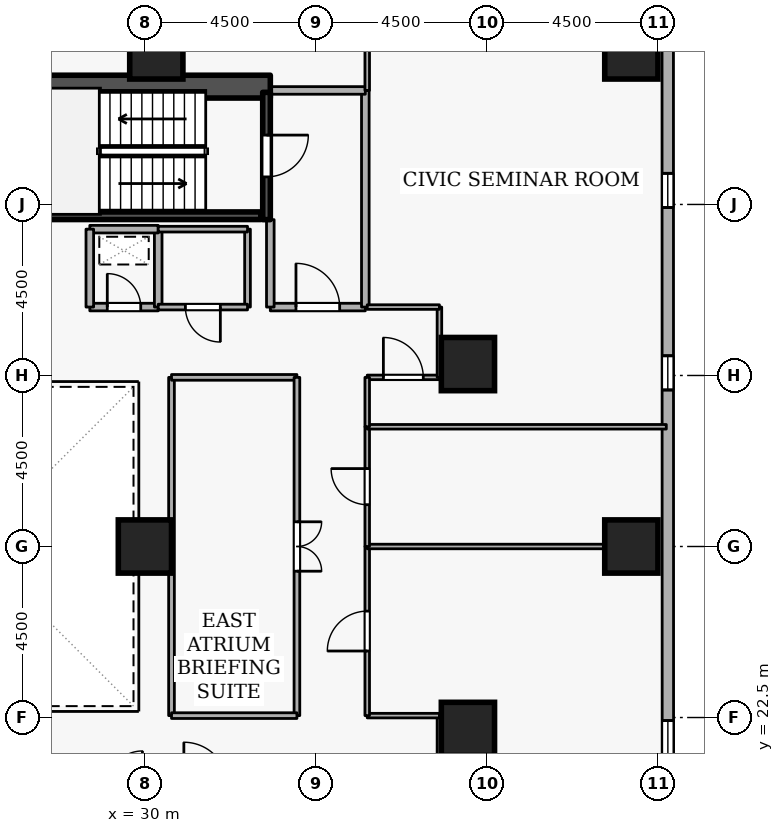
"""IFC4 building model, lengths in metres.
Left out: names, types, materials, properties, quantities, classifications, styles, units other than length and angle.
Written with IfcOpenShell. Run it as: python <this file> out.ifc"""

import sys

from ifc_helpers import new_model, si_unit, direction, frame, frame_2d, origin, origin_2d, place, context, subcontext, project, spatial, rectangle, extrude, element, fill, save


model = new_model("IFC4")
c1 = context("Model", 3, precision=1e-05, world=origin(), true_north=direction((0.0, 1.0)))
c2 = subcontext(c1, "Body", "Model", "MODEL_VIEW")
j1 = project(units=[si_unit("LENGTHUNIT", "METRE"), si_unit("PLANEANGLEUNIT", "RADIAN")], contexts=[c1])
p1 = place(None, origin())
s1 = spatial("IfcSite", under=j1, at=p1, CompositionType="ELEMENT")
p2 = place(p1, origin())
s2 = spatial("IfcBuilding", under=s1, at=p2, CompositionType="ELEMENT")
p3 = place(p2, frame((0.0, 0.0, 42.3)))
s3 = spatial("IfcBuildingStorey", under=s2, at=p3, CompositionType="ELEMENT", Elevation=42.3)
p4 = place(p3, frame((17.7, 39.1, 0.0), z_axis=(0.0, 0.0, 1.0), x_axis=(1.0, 0.0, 0.0)))
e1 = element("IfcWall", 1, at=p4, inside=s3, PredefinedType="SHEAR", context=c2, shape_type="SweptSolid", body=[
    extrude(rectangle(XDim=15.6, YDim=0.6, at=frame_2d((7.8, 0.0))), origin(), (0.0, 0.0, 1.0), 3.6),
])
for number, where, z_axis, x_axis in (
    (2, (42.8, 27.0, 0.0), (0.0, 0.0, 1.0), (1.0, 0.0, 0.0)),
    (3, (42.8, 40.0, 0.0), (0.0, 0.0, 1.0), (1.0, 0.0, 0.0)),
    (4, (38.5, 22.2, 0.0), (0.0, 0.0, 1.0), (1.0, 0.0, 0.0)),
    (5, (38.5, 31.8, 0.0), (0.0, 0.0, 1.0), (1.0, 0.0, 0.0)),
    (6, (30.3, 40.0, 0.0), (0.0, 0.0, 1.0), (1.0, 0.0, 0.0)),
    (7, (30.0, 27.0, 0.0), (0.0, 0.0, 1.0), (1.0, 0.0, 0.0)),
):
    element("IfcColumn", number, at=place(p3, frame(where, z_axis=z_axis, x_axis=x_axis)), inside=s3, PredefinedType="COLUMN", context=c2, shape_type="SweptSolid", body=[
        extrude(rectangle(XDim=1.4, YDim=1.4, at=origin_2d()), origin(), (0.0, 0.0, 1.0), 3.6),
    ])
p5 = place(p3, frame((43.765, 5.319, 0.0), z_axis=(0.0, 0.0, 1.0), x_axis=(-0.000208784245, 0.999999978205, 0.0)))
e8 = element("IfcWall", 8, at=p5, inside=s3, PredefinedType="STANDARD", context=c2, shape_type="SweptSolid", body=[
    extrude(rectangle(XDim=35.08, YDim=0.3, at=frame_2d((17.54, 0.0))), origin(), (0.0, 0.0, 1.0), 2.7),
])
p6 = place(p5, frame((1.8, 0.0, 0.72)))
e9 = element("IfcOpeningElement", 9, at=p6, cuts=e8, PredefinedType="OPENING", context=c2, shape_type="SweptSolid", body=[
    extrude(rectangle(XDim=0.9, YDim=1.75, at=frame_2d((0.45, 0.875))), frame((0.0, 0.16, 0.0), z_axis=(0.0, -1.0, 0.0), x_axis=(1.0, 0.0, 0.0)), (0.0, 0.0, 1.0), 0.32),
])
p7 = place(p5, frame((6.6, 0.0, 0.72)))
e10 = element("IfcOpeningElement", 10, at=p7, cuts=e8, PredefinedType="OPENING", context=c2, shape_type="SweptSolid", body=[
    extrude(rectangle(XDim=0.9, YDim=1.75, at=frame_2d((0.45, 0.875))), frame((0.0, 0.16, 0.0), z_axis=(0.0, -1.0, 0.0), x_axis=(1.0, 0.0, 0.0)), (0.0, 0.0, 1.0), 0.32),
])
p8 = place(p5, frame((11.4, 0.0, 0.72)))
e11 = element("IfcOpeningElement", 11, at=p8, cuts=e8, PredefinedType="OPENING", context=c2, shape_type="SweptSolid", body=[
    extrude(rectangle(XDim=0.9, YDim=1.75, at=frame_2d((0.45, 0.875))), frame((0.0, 0.16, 0.0), z_axis=(0.0, -1.0, 0.0), x_axis=(1.0, 0.0, 0.0)), (0.0, 0.0, 1.0), 0.32),
])
p9 = place(p5, frame((16.2, 0.0, 0.72)))
e12 = element("IfcOpeningElement", 12, at=p9, cuts=e8, PredefinedType="OPENING", context=c2, shape_type="SweptSolid", body=[
    extrude(rectangle(XDim=0.9, YDim=1.75, at=frame_2d((0.45, 0.875))), frame((0.0, 0.16, 0.0), z_axis=(0.0, -1.0, 0.0), x_axis=(1.0, 0.0, 0.0)), (0.0, 0.0, 1.0), 0.32),
])
p10 = place(p5, frame((25.8, 0.0, 0.72)))
e13 = element("IfcOpeningElement", 13, at=p10, cuts=e8, PredefinedType="OPENING", context=c2, shape_type="SweptSolid", body=[
    extrude(rectangle(XDim=0.9, YDim=1.75, at=frame_2d((0.45, 0.875))), frame((0.0, 0.16, 0.0), z_axis=(0.0, -1.0, 0.0), x_axis=(1.0, 0.0, 0.0)), (0.0, 0.0, 1.0), 0.32),
])
p11 = place(p5, frame((30.6, 0.0, 0.72)))
e14 = element("IfcOpeningElement", 14, at=p11, cuts=e8, PredefinedType="OPENING", context=c2, shape_type="SweptSolid", body=[
    extrude(rectangle(XDim=0.9, YDim=1.75, at=frame_2d((0.45, 0.875))), frame((0.0, 0.16, 0.0), z_axis=(0.0, -1.0, 0.0), x_axis=(1.0, 0.0, 0.0)), (0.0, 0.0, 1.0), 0.32),
])
p12 = place(p3, frame((33.2, 38.95, 0.0), z_axis=(0.0, 0.0, 1.0), x_axis=(0.0, -1.0, 0.0)))
e15 = element("IfcWall", 15, at=p12, inside=s3, PredefinedType="SHEAR", context=c2, shape_type="SweptSolid", body=[
    extrude(rectangle(XDim=3.35, YDim=0.2, at=frame_2d((1.675, 0.0))), origin(), (0.0, 0.0, 1.0), 3.6),
])
p13 = place(p12, frame((1.125, 0.0, 0.0)))
e16 = element("IfcOpeningElement", 16, at=p13, cuts=e15, PredefinedType="OPENING", context=c2, shape_type="SweptSolid", body=[
    extrude(rectangle(XDim=1.1, YDim=2.1, at=frame_2d((0.55, 1.05))), frame((0.0, 0.11, 0.0), z_axis=(0.0, -1.0, 0.0), x_axis=(1.0, 0.0, 0.0)), (0.0, 0.0, 1.0), 0.22),
])
p14 = place(p3, frame((25.95, 35.703, 0.0), z_axis=(0.0, 0.0, 1.0), x_axis=(1.0, 0.0, 0.0)))
e17 = element("IfcWall", 17, at=p14, inside=s3, PredefinedType="SHEAR", context=c2, shape_type="SweptSolid", body=[
    extrude(rectangle(XDim=7.1, YDim=0.2, at=frame_2d((3.55, 0.0))), origin(), (0.0, 0.0, 1.0), 3.6),
])
p15 = place(p3, frame((33.3, 33.3, 0.0), z_axis=(0.0, 0.0, 1.0), x_axis=(1.0, 0.0, 0.0)))
e18 = element("IfcWall", 18, at=p15, inside=s3, PredefinedType="STANDARD", context=c2, shape_type="SweptSolid", body=[
    extrude(rectangle(XDim=2.5, YDim=0.2, at=frame_2d((1.25, 0.0))), origin(), (0.0, 0.0, 1.0), 3.34),
])
p16 = place(p15, frame((0.675, 0.0, 0.0)))
e19 = element("IfcOpeningElement", 19, at=p16, cuts=e18, PredefinedType="OPENING", context=c2, shape_type="SweptSolid", body=[
    extrude(rectangle(XDim=1.15, YDim=2.1, at=frame_2d((0.575, 1.05))), frame((0.0, 0.11, 0.0), z_axis=(0.0, -1.0, 0.0), x_axis=(1.0, 0.0, 0.0)), (0.0, 0.0, 1.0), 0.22),
])
p17 = place(p3, frame((35.8, 33.3, 0.0), z_axis=(0.0, 0.0, 1.0), x_axis=(0.0, 1.0, 0.0)))
e20 = element("IfcWall", 20, at=p17, inside=s3, PredefinedType="STANDARD", context=c2, shape_type="SweptSolid", body=[
    extrude(rectangle(XDim=5.7, YDim=0.2, at=frame_2d((2.85, 0.0))), origin(), (0.0, 0.0, 1.0), 3.34),
])
p18 = place(p3, frame((35.8, 39.0, 0.0), z_axis=(0.0, 0.0, 1.0), x_axis=(-1.0, 0.0, 0.0)))
e21 = element("IfcWall", 21, at=p18, inside=s3, PredefinedType="STANDARD", context=c2, shape_type="SweptSolid", body=[
    extrude(rectangle(XDim=2.5, YDim=0.2, at=frame_2d((1.25, 0.0))), origin(), (0.0, 0.0, 1.0), 3.34),
])
p19 = place(p3, frame((33.3, 35.6, 0.0), z_axis=(0.0, 0.0, 1.0), x_axis=(0.0, -1.0, 0.0)))
e22 = element("IfcWall", 22, at=p19, inside=s3, PredefinedType="STANDARD", context=c2, shape_type="SweptSolid", body=[
    extrude(rectangle(XDim=2.3, YDim=0.2, at=frame_2d((1.15, 0.0))), origin(), (0.0, 0.0, 1.0), 2.545),
])
p20 = place(p3, frame((28.55, 33.3, 0.0), z_axis=(0.0, 0.0, 1.0), x_axis=(1.0, 0.0, 0.0)))
e23 = element("IfcWall", 23, at=p20, inside=s3, PredefinedType="STANDARD", context=c2, shape_type="SweptSolid", body=[
    extrude(rectangle(XDim=1.8, YDim=0.2, at=frame_2d((0.9, 0.0))), origin(), (0.0, 0.0, 1.0), 3.34),
])
p21 = place(p20, frame((0.46, 0.0, 0.0)))
e24 = element("IfcOpeningElement", 24, at=p21, cuts=e23, PredefinedType="OPENING", context=c2, shape_type="SweptSolid", body=[
    extrude(rectangle(XDim=0.88, YDim=2.04, at=frame_2d((0.44, 1.02))), frame((0.0, 0.11, 0.0), z_axis=(0.0, -1.0, 0.0), x_axis=(1.0, 0.0, 0.0)), (0.0, 0.0, 1.0), 0.22),
])
p22 = place(p3, frame((30.35, 33.3, 0.0), z_axis=(0.0, 0.0, 1.0), x_axis=(0.0, 1.0, 0.0)))
e25 = element("IfcWall", 25, at=p22, inside=s3, PredefinedType="STANDARD", context=c2, shape_type="SweptSolid", body=[
    extrude(rectangle(XDim=2.05, YDim=0.2, at=frame_2d((1.025, 0.0))), origin(), (0.0, 0.0, 1.0), 3.34),
])
p23 = place(p3, frame((30.35, 35.35, 0.0), z_axis=(0.0, 0.0, 1.0), x_axis=(-1.0, 0.0, 0.0)))
e26 = element("IfcWall", 26, at=p23, inside=s3, PredefinedType="STANDARD", context=c2, shape_type="SweptSolid", body=[
    extrude(rectangle(XDim=1.8, YDim=0.2, at=frame_2d((0.9, 0.0))), origin(), (0.0, 0.0, 1.0), 3.34),
])
p24 = place(p3, frame((28.55, 35.35, 0.0), z_axis=(0.0, 0.0, 1.0), x_axis=(0.0, -1.0, 0.0)))
e27 = element("IfcWall", 27, at=p24, inside=s3, PredefinedType="STANDARD", context=c2, shape_type="SweptSolid", body=[
    extrude(rectangle(XDim=2.05, YDim=0.2, at=frame_2d((1.025, 0.0))), origin(), (0.0, 0.0, 1.0), 3.34),
])
p25 = place(p3, frame((32.7, 35.35, 0.0), z_axis=(0.0, 0.0, 1.0), x_axis=(0.0, -1.0, 0.0)))
e28 = element("IfcWall", 28, at=p25, inside=s3, PredefinedType="PARTITIONING", context=c2, shape_type="SweptSolid", body=[
    extrude(rectangle(XDim=2.05, YDim=0.15, at=frame_2d((1.025, 0.0))), origin(), (0.0, 0.0, 1.0), 2.545),
])
p26 = place(p3, frame((32.7, 33.3, 0.0), z_axis=(0.0, 0.0, 1.0), x_axis=(-1.0, 0.0, 0.0)))
e29 = element("IfcWall", 29, at=p26, inside=s3, PredefinedType="PARTITIONING", context=c2, shape_type="SweptSolid", body=[
    extrude(rectangle(XDim=2.35, YDim=0.15, at=frame_2d((1.175, 0.0))), origin(), (0.0, 0.0, 1.0), 3.34),
])
p27 = place(p26, frame((0.715, 0.0, 0.0)))
e30 = element("IfcOpeningElement", 30, at=p27, cuts=e29, PredefinedType="OPENING", context=c2, shape_type="SweptSolid", body=[
    extrude(rectangle(XDim=0.92, YDim=2.08, at=frame_2d((0.46, 1.04))), frame((0.0, 0.085, 0.0), z_axis=(0.0, -1.0, 0.0), x_axis=(1.0, 0.0, 0.0)), (0.0, 0.0, 1.0), 0.17),
])
p28 = place(p3, frame((30.35, 35.35, 0.0), z_axis=(0.0, 0.0, 1.0), x_axis=(1.0, 0.0, 0.0)))
e31 = element("IfcWall", 31, at=p28, inside=s3, PredefinedType="PARTITIONING", context=c2, shape_type="SweptSolid", body=[
    extrude(rectangle(XDim=2.35, YDim=0.15, at=frame_2d((1.175, 0.0))), origin(), (0.0, 0.0, 1.0), 3.34),
])
p29 = place(p3, frame((37.75, 20.7, 0.0), z_axis=(0.0, 0.0, 1.0), x_axis=(0.0, 1.0, 0.0)))
e32 = element("IfcWall", 32, at=p29, inside=s3, PredefinedType="PARTITIONING", context=c2, shape_type="SweptSolid", body=[
    extrude(rectangle(XDim=1.85, YDim=0.12, at=frame_2d((0.925, 0.0))), origin(), (0.0, 0.0, 1.0), 3.34),
])
p30 = place(p3, frame((37.75, 22.55, 0.0), z_axis=(0.0, 0.0, 1.0), x_axis=(-1.0, 0.0, 0.0)))
e33 = element("IfcWall", 33, at=p30, inside=s3, PredefinedType="PARTITIONING", context=c2, shape_type="SweptSolid", body=[
    extrude(rectangle(XDim=1.9, YDim=0.12, at=frame_2d((0.95, 0.0))), origin(), (0.0, 0.0, 1.0), 3.34),
])
p31 = place(p3, frame((35.85, 22.55, 0.0), z_axis=(0.0, 0.0, 1.0), x_axis=(0.0, 1.0, 0.0)))
e34 = element("IfcWall", 34, at=p31, inside=s3, PredefinedType="PARTITIONING", context=c2, shape_type="SweptSolid", body=[
    extrude(rectangle(XDim=4.45, YDim=0.12, at=frame_2d((2.225, 0.0))), origin(), (0.0, 0.0, 1.0), 3.34),
])
p32 = place(p31, frame((1.7, 0.0, 0.0)))
e35 = element("IfcOpeningElement", 35, at=p32, cuts=e34, PredefinedType="OPENING", context=c2, shape_type="SweptSolid", body=[
    extrude(rectangle(XDim=1.05, YDim=2.1, at=frame_2d((0.525, 1.05))), frame((0.0, 0.07, 0.0), z_axis=(0.0, -1.0, 0.0), x_axis=(1.0, 0.0, 0.0)), (0.0, 0.0, 1.0), 0.14),
])
p33 = place(p3, frame((35.85, 27.0, 0.0), z_axis=(0.0, 0.0, 1.0), x_axis=(1.0, 0.0, 0.0)))
e36 = element("IfcWall", 36, at=p33, inside=s3, PredefinedType="PARTITIONING", context=c2, shape_type="SweptSolid", body=[
    extrude(rectangle(XDim=6.95, YDim=0.12, at=frame_2d((3.475, 0.0))), origin(), (0.0, 0.0, 1.0), 2.882),
])
p34 = place(p3, frame((35.85, 27.0, 0.0), z_axis=(0.0, 0.0, 1.0), x_axis=(0.0, 1.0, 0.0)))
e37 = element("IfcWall", 37, at=p34, inside=s3, PredefinedType="PARTITIONING", context=c2, shape_type="SweptSolid", body=[
    extrude(rectangle(XDim=3.15, YDim=0.12, at=frame_2d((1.575, 0.0))), origin(), (0.0, 0.0, 1.0), 3.34),
])
p35 = place(p34, frame((1.1, 0.0, 0.0)))
e38 = element("IfcOpeningElement", 38, at=p35, cuts=e37, PredefinedType="OPENING", context=c2, shape_type="SweptSolid", body=[
    extrude(rectangle(XDim=0.95, YDim=2.1, at=frame_2d((0.475, 1.05))), frame((0.0, 0.07, 0.0), z_axis=(0.0, -1.0, 0.0), x_axis=(1.0, 0.0, 0.0)), (0.0, 0.0, 1.0), 0.14),
])
p36 = place(p3, frame((35.85, 30.15, 0.0), z_axis=(0.0, 0.0, 1.0), x_axis=(1.0, 0.0, 0.0)))
e39 = element("IfcWall", 39, at=p36, inside=s3, PredefinedType="PARTITIONING", context=c2, shape_type="SweptSolid", body=[
    extrude(rectangle(XDim=7.87, YDim=0.12, at=frame_2d((3.935, 0.0))), origin(), (0.0, 0.0, 1.0), 3.34),
])
p37 = place(p3, frame((35.85, 31.45, 0.0), z_axis=(0.0, 0.0, 1.0), x_axis=(1.0, 0.0, 0.0)))
e40 = element("IfcWall", 40, at=p37, inside=s3, PredefinedType="PARTITIONING", context=c2, shape_type="SweptSolid", body=[
    extrude(rectangle(XDim=1.9, YDim=0.12, at=frame_2d((0.95, 0.0))), origin(), (0.0, 0.0, 1.0), 3.34),
])
p38 = place(p37, frame((0.425, 0.0, 0.0)))
e41 = element("IfcOpeningElement", 41, at=p38, cuts=e40, PredefinedType="OPENING", context=c2, shape_type="SweptSolid", body=[
    extrude(rectangle(XDim=1.05, YDim=2.1, at=frame_2d((0.525, 1.05))), frame((0.0, 0.07, 0.0), z_axis=(0.0, -1.0, 0.0), x_axis=(1.0, 0.0, 0.0)), (0.0, 0.0, 1.0), 0.14),
])
p39 = place(p3, frame((37.75, 31.45, 0.0), z_axis=(0.0, 0.0, 1.0), x_axis=(0.0, 1.0, 0.0)))
e42 = element("IfcWall", 42, at=p39, inside=s3, PredefinedType="PARTITIONING", context=c2, shape_type="SweptSolid", body=[
    extrude(rectangle(XDim=1.85, YDim=0.12, at=frame_2d((0.925, 0.0))), origin(), (0.0, 0.0, 1.0), 3.34),
])
p40 = place(p3, frame((37.75, 33.3, 0.0), z_axis=(0.0, 0.0, 1.0), x_axis=(-1.0, 0.0, 0.0)))
e43 = element("IfcWall", 43, at=p40, inside=s3, PredefinedType="PARTITIONING", context=c2, shape_type="SweptSolid", body=[
    extrude(rectangle(XDim=1.9, YDim=0.12, at=frame_2d((0.95, 0.0))), origin(), (0.0, 0.0, 1.0), 3.34),
])
p41 = place(p3, frame((35.85, 39.0, 0.0), z_axis=(0.0, 0.0, 1.0), x_axis=(0.0, 1.0, 0.0)))
e44 = element("IfcWall", 44, at=p41, inside=s3, PredefinedType="PARTITIONING", context=c2, shape_type="SweptSolid", body=[
    extrude(rectangle(XDim=6.22, YDim=0.12, at=frame_2d((3.11, 0.0))), origin(), (0.0, 0.0, 1.0), 3.34),
])
p42 = place(p3, frame((35.85, 30.15, 0.0), z_axis=(0.0, 0.0, 1.0), x_axis=(0.0, 1.0, 0.0)))
e45 = element("IfcWall", 45, at=p42, inside=s3, PredefinedType="PARTITIONING", context=c2, shape_type="SweptSolid", body=[
    extrude(rectangle(XDim=1.3, YDim=0.12, at=frame_2d((0.65, 0.0))), origin(), (0.0, 0.0, 1.0), 3.34),
])
p43 = place(p3, frame((30.7, 22.55, 0.0), z_axis=(0.0, 0.0, 1.0), x_axis=(0.0, 1.0, 0.0)))
e46 = element("IfcWall", 46, at=p43, inside=s3, PredefinedType="PARTITIONING", context=c2, shape_type="SweptSolid", body=[
    extrude(rectangle(XDim=8.9, YDim=0.15, at=frame_2d((4.45, 0.0))), origin(), (0.0, 0.0, 1.0), 3.34),
])
p44 = place(p3, frame((30.7, 31.45, 0.0), z_axis=(0.0, 0.0, 1.0), x_axis=(1.0, 0.0, 0.0)))
e47 = element("IfcWall", 47, at=p44, inside=s3, PredefinedType="PARTITIONING", context=c2, shape_type="SweptSolid", body=[
    extrude(rectangle(XDim=3.3, YDim=0.15, at=frame_2d((1.65, 0.0))), origin(), (0.0, 0.0, 1.0), 3.34),
])
p45 = place(p3, frame((34.0, 31.45, 0.0), z_axis=(0.0, 0.0, 1.0), x_axis=(0.0, -1.0, 0.0)))
e48 = element("IfcWall", 48, at=p45, inside=s3, PredefinedType="PARTITIONING", context=c2, shape_type="SweptSolid", body=[
    extrude(rectangle(XDim=8.9, YDim=0.15, at=frame_2d((4.45, 0.0))), origin(), (0.0, 0.0, 1.0), 3.34),
])
p46 = place(p45, frame((3.8, 0.0, 0.0)))
e49 = element("IfcOpeningElement", 49, at=p46, cuts=e48, PredefinedType="OPENING", context=c2, shape_type="SweptSolid", body=[
    extrude(rectangle(XDim=1.3, YDim=2.12, at=frame_2d((0.65, 1.06))), frame((0.0, 0.085, 0.0), z_axis=(0.0, -1.0, 0.0), x_axis=(1.0, 0.0, 0.0)), (0.0, 0.0, 1.0), 0.17),
])
p47 = place(p3, frame((34.0, 22.55, 0.0), z_axis=(0.0, 0.0, 1.0), x_axis=(-1.0, 0.0, 0.0)))
e50 = element("IfcWall", 50, at=p47, inside=s3, PredefinedType="PARTITIONING", context=c2, shape_type="SweptSolid", body=[
    extrude(rectangle(XDim=3.3, YDim=0.15, at=frame_2d((1.65, 0.0))), origin(), (0.0, 0.0, 1.0), 3.34),
])
p48 = place(p9, origin())
e51 = element("IfcWindow", 51, at=p48, inside=s3, PartitioningType="SINGLE_PANEL", PredefinedType="WINDOW", context=c2, shape_type="SweptSolid", body=[
    extrude(rectangle(XDim=0.9, YDim=1.75, at=frame_2d((0.45, 0.875))), frame((0.0, 0.03, 0.0), z_axis=(0.0, -1.0, 0.0), x_axis=(1.0, 0.0, 0.0)), (0.0, 0.0, 1.0), 0.06),
])
fill(e12, e51)
p49 = place(p10, origin())
e52 = element("IfcWindow", 52, at=p49, inside=s3, PartitioningType="SINGLE_PANEL", PredefinedType="WINDOW", context=c2, shape_type="SweptSolid", body=[
    extrude(rectangle(XDim=0.9, YDim=1.75, at=frame_2d((0.45, 0.875))), frame((0.0, 0.03, 0.0), z_axis=(0.0, -1.0, 0.0), x_axis=(1.0, 0.0, 0.0)), (0.0, 0.0, 1.0), 0.06),
])
fill(e13, e52)
p50 = place(p11, origin())
e53 = element("IfcWindow", 53, at=p50, inside=s3, PartitioningType="SINGLE_PANEL", PredefinedType="WINDOW", context=c2, shape_type="SweptSolid", body=[
    extrude(rectangle(XDim=0.9, YDim=1.75, at=frame_2d((0.45, 0.875))), frame((0.0, 0.03, 0.0), z_axis=(0.0, -1.0, 0.0), x_axis=(1.0, 0.0, 0.0)), (0.0, 0.0, 1.0), 0.06),
])
fill(e14, e53)
p51 = place(p13, origin())
e54 = element("IfcDoor", 54, at=p51, inside=s3, OperationType="SINGLE_SWING_LEFT", PredefinedType="DOOR", context=c2, shape_type="SweptSolid", body=[
    extrude(rectangle(XDim=1.1, YDim=2.1, at=frame_2d((0.55, 1.05))), frame((0.0, 0.025, 0.0), z_axis=(0.0, -1.0, 0.0), x_axis=(1.0, 0.0, 0.0)), (0.0, 0.0, 1.0), 0.05),
])
fill(e16, e54)
p52 = place(p16, origin())
e55 = element("IfcDoor", 55, at=p52, inside=s3, OperationType="SINGLE_SWING_LEFT", PredefinedType="DOOR", context=c2, shape_type="SweptSolid", body=[
    extrude(rectangle(XDim=1.15, YDim=2.1, at=frame_2d((0.575, 1.05))), frame((0.0, 0.025, 0.0), z_axis=(0.0, -1.0, 0.0), x_axis=(1.0, 0.0, 0.0)), (0.0, 0.0, 1.0), 0.05),
])
fill(e19, e55)
p53 = place(p21, origin())
e56 = element("IfcDoor", 56, at=p53, inside=s3, OperationType="SINGLE_SWING_LEFT", PredefinedType="DOOR", context=c2, shape_type="SweptSolid", body=[
    extrude(rectangle(XDim=0.88, YDim=2.04, at=frame_2d((0.44, 1.02))), frame((0.0, 0.025, 0.0), z_axis=(0.0, -1.0, 0.0), x_axis=(1.0, 0.0, 0.0)), (0.0, 0.0, 1.0), 0.05),
])
fill(e24, e56)
p54 = place(p27, origin())
e57 = element("IfcDoor", 57, at=p54, inside=s3, OperationType="SINGLE_SWING_LEFT", PredefinedType="DOOR", context=c2, shape_type="SweptSolid", body=[
    extrude(rectangle(XDim=0.92, YDim=2.08, at=frame_2d((0.46, 1.04))), frame((0.0, 0.025, 0.0), z_axis=(0.0, -1.0, 0.0), x_axis=(1.0, 0.0, 0.0)), (0.0, 0.0, 1.0), 0.05),
])
fill(e30, e57)
p55 = place(p32, origin())
e58 = element("IfcDoor", 58, at=p55, inside=s3, OperationType="SINGLE_SWING_LEFT", PredefinedType="DOOR", context=c2, shape_type="SweptSolid", body=[
    extrude(rectangle(XDim=1.05, YDim=2.1, at=frame_2d((0.525, 1.05))), frame((0.0, 0.025, 0.0), z_axis=(0.0, -1.0, 0.0), x_axis=(1.0, 0.0, 0.0)), (0.0, 0.0, 1.0), 0.05),
])
fill(e35, e58)
p56 = place(p35, origin())
e59 = element("IfcDoor", 59, at=p56, inside=s3, OperationType="SINGLE_SWING_RIGHT", PredefinedType="DOOR", context=c2, shape_type="SweptSolid", body=[
    extrude(rectangle(XDim=0.95, YDim=2.1, at=frame_2d((0.475, 1.05))), frame((0.0, 0.025, 0.0), z_axis=(0.0, -1.0, 0.0), x_axis=(1.0, 0.0, 0.0)), (0.0, 0.0, 1.0), 0.05),
])
fill(e38, e59)
p57 = place(p38, origin())
e60 = element("IfcDoor", 60, at=p57, inside=s3, OperationType="SINGLE_SWING_LEFT", PredefinedType="DOOR", context=c2, shape_type="SweptSolid", body=[
    extrude(rectangle(XDim=1.05, YDim=2.1, at=frame_2d((0.525, 1.05))), frame((0.0, 0.025, 0.0), z_axis=(0.0, -1.0, 0.0), x_axis=(1.0, 0.0, 0.0)), (0.0, 0.0, 1.0), 0.05),
])
fill(e41, e60)
p58 = place(p46, origin())
e61 = element("IfcDoor", 61, at=p58, inside=s3, OperationType="DOUBLE_DOOR_SINGLE_SWING", PredefinedType="DOOR", context=c2, shape_type="SweptSolid", body=[
    extrude(rectangle(XDim=1.3, YDim=2.12, at=frame_2d((0.65, 1.06))), frame((0.0, 0.025, 0.0), z_axis=(0.0, -1.0, 0.0), x_axis=(1.0, 0.0, 0.0)), (0.0, 0.0, 1.0), 0.05),
])
fill(e49, e61)
save(model, sys.argv[1])
